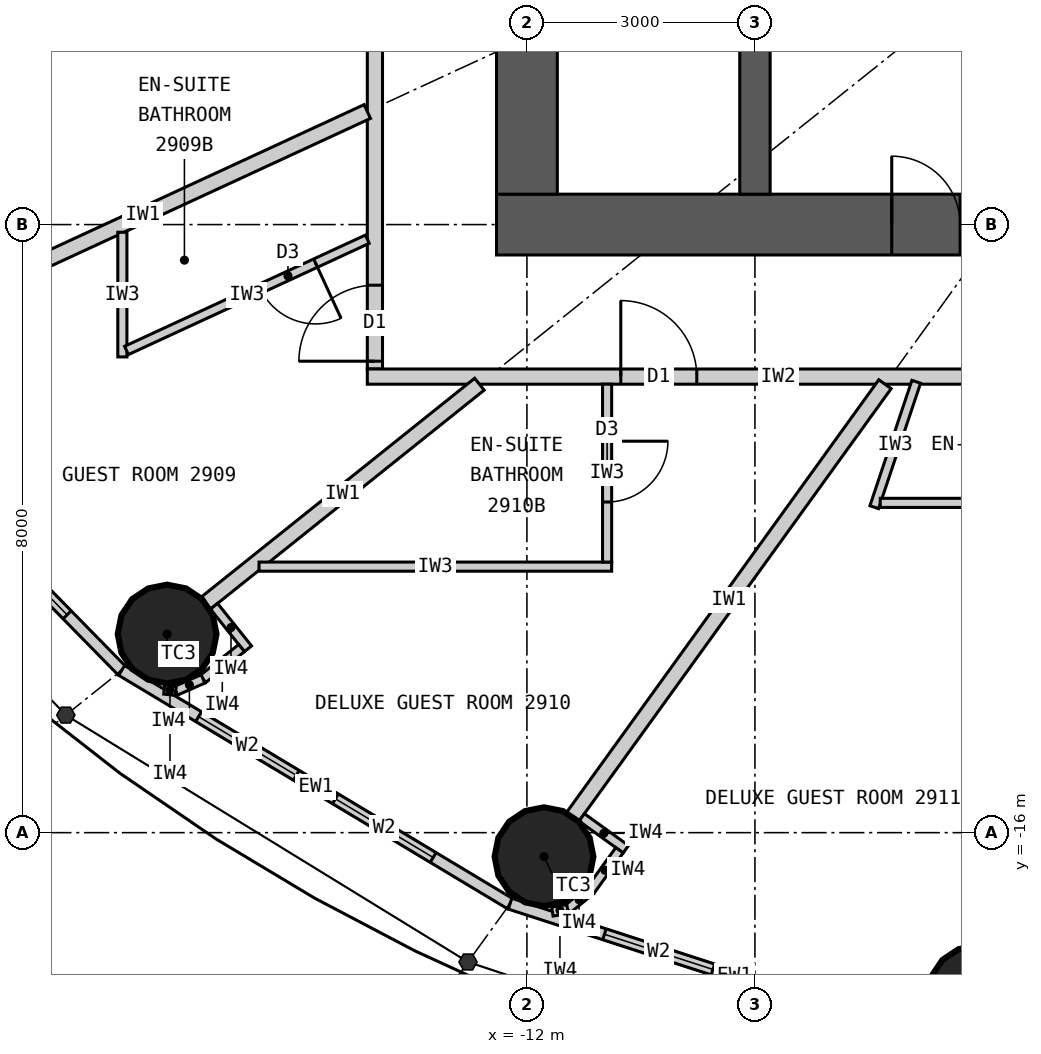
"""IFC4 building model, lengths in metres.
Left out: names, types, materials, properties, quantities, classifications, styles, units other than length and angle.
Written with IfcOpenShell. Run it as: python <this file> out.ifc"""

import sys

from ifc_helpers import new_model, si_unit, direction, frame, frame_2d, origin, origin_2d, place, context, subcontext, project, spatial, rectangle, circle, extrude, element, fill, save


model = new_model("IFC4")
c1 = context("Model", 3, precision=1e-05, world=origin(), true_north=direction((0.0, 1.0)))
c2 = subcontext(c1, "Body", "Model", "MODEL_VIEW")
j1 = project(units=[si_unit("LENGTHUNIT", "METRE"), si_unit("PLANEANGLEUNIT", "RADIAN")], contexts=[c1])
p1 = place(None, origin())
s1 = spatial("IfcSite", under=j1, at=p1, CompositionType="ELEMENT")
p2 = place(p1, origin())
s2 = spatial("IfcBuilding", under=s1, at=p2, CompositionType="ELEMENT")
p3 = place(p2, frame((0.0, 0.0, 115.5)))
s3 = spatial("IfcBuildingStorey", under=s2, at=p3, CompositionType="ELEMENT", Elevation=115.5)
for number, where, z_axis, x_axis in (
    (1, (-16.734, -13.387, 0.0), (0.0, 0.0, 1.0), (1.0, 0.0, 0.0)),
    (2, (-11.775, -16.316, 0.0), (0.0, 0.0, 1.0), (1.0, 0.0, 0.0)),
    (3, (-6.074, -18.135, 0.0), (0.0, 0.0, 1.0), (1.0, 0.0, 0.0)),
):
    element("IfcColumn", number, at=place(p3, frame(where, z_axis=z_axis, x_axis=x_axis)), inside=s3, PredefinedType="COLUMN", context=c2, shape_type="SweptSolid", body=[
        extrude(circle(Radius=0.65, at=origin_2d()), origin(), (0.0, 0.0, 1.0), 3.3),
    ])
p4 = place(p3, frame((12.4, -8.0, 0.0), z_axis=(0.0, 0.0, 1.0), x_axis=(-1.0, 0.0, 0.0)))
e4 = element("IfcWall", 4, at=p4, inside=s3, PredefinedType="SHEAR", context=c2, shape_type="SweptSolid", body=[
    extrude(rectangle(XDim=24.8, YDim=0.8, at=frame_2d((12.4, 0.0))), origin(), (0.0, 0.0, 1.0), 3.3),
])
p5 = place(p4, frame((11.1, 0.0, 0.0)))
e5 = element("IfcOpeningElement", 5, at=p5, cuts=e4, PredefinedType="OPENING", context=c2, shape_type="SweptSolid", body=[
    extrude(rectangle(XDim=1.2, YDim=2.2, at=frame_2d((0.6, 1.1))), frame((0.0, 0.41, 0.0), z_axis=(0.0, -1.0, 0.0), x_axis=(1.0, 0.0, 0.0)), (0.0, 0.0, 1.0), 0.82),
])
p6 = place(p4, frame((18.7, 0.0, 0.0)))
e6 = element("IfcOpeningElement", 6, at=p6, cuts=e4, PredefinedType="OPENING", context=c2, shape_type="SweptSolid", body=[
    extrude(rectangle(XDim=0.9, YDim=2.2, at=frame_2d((0.45, 1.1))), frame((0.0, 0.41, 0.0), z_axis=(0.0, -1.0, 0.0), x_axis=(1.0, 0.0, 0.0)), (0.0, 0.0, 1.0), 0.82),
])
p7 = place(p3, frame((-12.0, 7.6, 0.0), z_axis=(0.0, 0.0, 1.0), x_axis=(0.0, -1.0, 0.0)))
e7 = element("IfcWall", 7, at=p7, inside=s3, PredefinedType="SHEAR", context=c2, shape_type="SweptSolid", body=[
    extrude(rectangle(XDim=15.2, YDim=0.8, at=frame_2d((7.6, 0.0))), origin(), (0.0, 0.0, 1.0), 3.3),
])
p8 = place(p7, frame((6.7, 0.0, 0.0)))
e8 = element("IfcOpeningElement", 8, at=p8, cuts=e7, PredefinedType="OPENING", context=c2, shape_type="SweptSolid", body=[
    extrude(rectangle(XDim=1.8, YDim=2.2, at=frame_2d((0.9, 1.1))), frame((0.0, 0.41, 0.0), z_axis=(0.0, -1.0, 0.0), x_axis=(1.0, 0.0, 0.0)), (0.0, 0.0, 1.0), 0.82),
])
p9 = place(p3, frame((-9.0, -7.6, 0.0), z_axis=(0.0, 0.0, 1.0), x_axis=(0.0, 1.0, 0.0)))
e9 = element("IfcWall", 9, at=p9, inside=s3, PredefinedType="SHEAR", context=c2, shape_type="SweptSolid", body=[
    extrude(rectangle(XDim=3.1, YDim=0.4, at=frame_2d((1.55, 0.0))), origin(), (0.0, 0.0, 1.0), 3.3),
])
p10 = place(p3, frame((-21.287, -9.832, 0.0), z_axis=(0.0, 0.0, 1.0), x_axis=(0.700136650834, -0.714008872605, 0.0)))
e10 = element("IfcWall", 10, at=p10, inside=s3, PredefinedType="ELEMENTEDWALL", context=c2, shape_type="SweptSolid", body=[
    extrude(rectangle(XDim=5.649, YDim=0.15, at=frame_2d((2.825, 0.0))), origin(), (0.0, 0.0, 1.0), 3.12),
])
p11 = place(p10, frame((1.025, 0.0, 0.9)))
e11 = element("IfcOpeningElement", 11, at=p11, cuts=e10, PredefinedType="OPENING", context=c2, shape_type="SweptSolid", body=[
    extrude(rectangle(XDim=1.5, YDim=1.9, at=frame_2d((0.75, 0.95))), frame((0.0, 0.085, 0.0), z_axis=(0.0, -1.0, 0.0), x_axis=(1.0, 0.0, 0.0)), (0.0, 0.0, 1.0), 0.17),
])
p12 = place(p10, frame((3.125, 0.0, 0.9)))
e12 = element("IfcOpeningElement", 12, at=p12, cuts=e10, PredefinedType="OPENING", context=c2, shape_type="SweptSolid", body=[
    extrude(rectangle(XDim=1.5, YDim=1.9, at=frame_2d((0.75, 0.95))), frame((0.0, 0.085, 0.0), z_axis=(0.0, -1.0, 0.0), x_axis=(1.0, 0.0, 0.0)), (0.0, 0.0, 1.0), 0.17),
])
p13 = place(p3, frame((-17.332, -13.866, 0.0), z_axis=(0.0, 0.0, 1.0), x_axis=(0.857308573723, -0.514802884044, 0.0)))
e13 = element("IfcWall", 13, at=p13, inside=s3, PredefinedType="ELEMENTEDWALL", context=c2, shape_type="SweptSolid", body=[
    extrude(rectangle(XDim=5.961, YDim=0.15, at=frame_2d((2.98, 0.0))), origin(), (0.0, 0.0, 1.0), 3.12),
])
p14 = place(p13, frame((1.181, 0.0, 0.9)))
e14 = element("IfcOpeningElement", 14, at=p14, cuts=e13, PredefinedType="OPENING", context=c2, shape_type="SweptSolid", body=[
    extrude(rectangle(XDim=1.5, YDim=1.9, at=frame_2d((0.75, 0.95))), frame((0.0, 0.085, 0.0), z_axis=(0.0, -1.0, 0.0), x_axis=(1.0, 0.0, 0.0)), (0.0, 0.0, 1.0), 0.17),
])
p15 = place(p13, frame((3.281, 0.0, 0.9)))
e15 = element("IfcOpeningElement", 15, at=p15, cuts=e13, PredefinedType="OPENING", context=c2, shape_type="SweptSolid", body=[
    extrude(rectangle(XDim=1.5, YDim=1.9, at=frame_2d((0.75, 0.95))), frame((0.0, 0.085, 0.0), z_axis=(0.0, -1.0, 0.0), x_axis=(1.0, 0.0, 0.0)), (0.0, 0.0, 1.0), 0.17),
])
p16 = place(p3, frame((-12.221, -16.935, 0.0), z_axis=(0.0, 0.0, 1.0), x_axis=(0.951272691506, -0.308350881944, 0.0)))
e16 = element("IfcWall", 16, at=p16, inside=s3, PredefinedType="ELEMENTEDWALL", context=c2, shape_type="SweptSolid", body=[
    extrude(rectangle(XDim=6.211, YDim=0.15, at=frame_2d((3.105, 0.0))), origin(), (0.0, 0.0, 1.0), 3.12),
])
p17 = place(p16, frame((1.305, 0.0, 0.9)))
e17 = element("IfcOpeningElement", 17, at=p17, cuts=e16, PredefinedType="OPENING", context=c2, shape_type="SweptSolid", body=[
    extrude(rectangle(XDim=1.5, YDim=1.9, at=frame_2d((0.75, 0.95))), frame((0.0, 0.085, 0.0), z_axis=(0.0, -1.0, 0.0), x_axis=(1.0, 0.0, 0.0)), (0.0, 0.0, 1.0), 0.17),
])
p18 = place(p16, frame((3.405, 0.0, 0.9)))
e18 = element("IfcOpeningElement", 18, at=p18, cuts=e16, PredefinedType="OPENING", context=c2, shape_type="SweptSolid", body=[
    extrude(rectangle(XDim=1.5, YDim=1.9, at=frame_2d((0.75, 0.95))), frame((0.0, 0.085, 0.0), z_axis=(0.0, -1.0, 0.0), x_axis=(1.0, 0.0, 0.0)), (0.0, 0.0, 1.0), 0.17),
])
p19 = place(p3, frame((-14.0, 9.9, 0.0), z_axis=(0.0, 0.0, 1.0), x_axis=(0.0, -1.0, 0.0)))
e19 = element("IfcWall", 19, at=p19, inside=s3, PredefinedType="PARTITIONING", context=c2, shape_type="SweptSolid", body=[
    extrude(rectangle(XDim=19.8, YDim=0.2, at=frame_2d((9.9, 0.0))), origin(), (0.0, 0.0, 1.0), 3.12),
])
p20 = place(p19, frame((3.622, 0.0, 0.0)))
e20 = element("IfcOpeningElement", 20, at=p20, cuts=e19, PredefinedType="OPENING", context=c2, shape_type="SweptSolid", body=[
    extrude(rectangle(XDim=1.0, YDim=2.2, at=frame_2d((0.5, 1.1))), frame((0.0, 0.11, 0.0), z_axis=(0.0, -1.0, 0.0), x_axis=(1.0, 0.0, 0.0)), (0.0, 0.0, 1.0), 0.22),
])
p21 = place(p19, frame((9.238, 0.0, 0.0)))
e21 = element("IfcOpeningElement", 21, at=p21, cuts=e19, PredefinedType="OPENING", context=c2, shape_type="SweptSolid", body=[
    extrude(rectangle(XDim=1.0, YDim=2.2, at=frame_2d((0.5, 1.1))), frame((0.0, 0.11, 0.0), z_axis=(0.0, -1.0, 0.0), x_axis=(1.0, 0.0, 0.0)), (0.0, 0.0, 1.0), 0.22),
])
p22 = place(p19, frame((13.742, 0.0, 0.0)))
e22 = element("IfcOpeningElement", 22, at=p22, cuts=e19, PredefinedType="OPENING", context=c2, shape_type="SweptSolid", body=[
    extrude(rectangle(XDim=1.0, YDim=2.2, at=frame_2d((0.5, 1.1))), frame((0.0, 0.11, 0.0), z_axis=(0.0, -1.0, 0.0), x_axis=(1.0, 0.0, 0.0)), (0.0, 0.0, 1.0), 0.22),
])
p23 = place(p19, frame((18.698, 0.0, 0.0)))
e23 = element("IfcOpeningElement", 23, at=p23, cuts=e19, PredefinedType="OPENING", context=c2, shape_type="SweptSolid", body=[
    extrude(rectangle(XDim=1.0, YDim=2.2, at=frame_2d((0.5, 1.1))), frame((0.0, 0.11, 0.0), z_axis=(0.0, -1.0, 0.0), x_axis=(1.0, 0.0, 0.0)), (0.0, 0.0, 1.0), 0.22),
])
p24 = place(p3, frame((-3.283, -10.0, 0.0), z_axis=(0.0, 0.0, 1.0), x_axis=(-1.0, 0.0, 0.0)))
e24 = element("IfcWall", 24, at=p24, inside=s3, PredefinedType="PARTITIONING", context=c2, shape_type="SweptSolid", body=[
    extrude(rectangle(XDim=10.817, YDim=0.2, at=frame_2d((5.409, 0.0))), origin(), (0.0, 0.0, 1.0), 3.12),
])
p25 = place(p24, frame((6.482, 0.0, 0.0)))
e25 = element("IfcOpeningElement", 25, at=p25, cuts=e24, PredefinedType="OPENING", context=c2, shape_type="SweptSolid", body=[
    extrude(rectangle(XDim=1.0, YDim=2.2, at=frame_2d((0.5, 1.1))), frame((0.0, 0.11, 0.0), z_axis=(0.0, -1.0, 0.0), x_axis=(1.0, 0.0, 0.0)), (0.0, 0.0, 1.0), 0.22),
])
p26 = place(p3, frame((-14.1, -6.512, 0.0), z_axis=(0.0, 0.0, 1.0), x_axis=(-0.907833019998, -0.419331858797, 0.0)))
e26 = element("IfcWall", 26, at=p26, inside=s3, PredefinedType="PARTITIONING", context=c2, shape_type="SweptSolid", body=[
    extrude(rectangle(XDim=6.505, YDim=0.2, at=frame_2d((3.252, 0.0))), origin(), (0.0, 0.0, 1.0), 2.27),
])
p27 = place(p3, frame((-12.625, -10.1, 0.0), z_axis=(0.0, 0.0, 1.0), x_axis=(-0.780863644897, -0.624701503182, 0.0)))
e27 = element("IfcWall", 27, at=p27, inside=s3, PredefinedType="PARTITIONING", context=c2, shape_type="SweptSolid", body=[
    extrude(rectangle(XDim=4.612, YDim=0.2, at=frame_2d((2.306, 0.0))), origin(), (0.0, 0.0, 1.0), 2.37),
])
p28 = place(p3, frame((-7.289, -10.1, 0.0), z_axis=(0.0, 0.0, 1.0), x_axis=(-0.585217367024, -0.81087645997, 0.0)))
e28 = element("IfcWall", 28, at=p28, inside=s3, PredefinedType="PARTITIONING", context=c2, shape_type="SweptSolid", body=[
    extrude(rectangle(XDim=7.016, YDim=0.2, at=frame_2d((3.508, 0.0))), origin(), (0.0, 0.0, 1.0), 2.37),
])
p29 = place(p3, frame((-17.323, -8.101, 0.0), z_axis=(0.0, 0.0, 1.0), x_axis=(0.0, -1.0, 0.0)))
e29 = element("IfcWall", 29, at=p29, inside=s3, PredefinedType="PARTITIONING", context=c2, shape_type="SweptSolid", body=[
    extrude(rectangle(XDim=1.64, YDim=0.12, at=frame_2d((0.82, 0.0))), origin(), (0.0, 0.0, 1.0), 3.12),
])
p30 = place(p3, frame((-14.1, -8.193, 0.0), z_axis=(0.0, 0.0, 1.0), x_axis=(-0.907836493557, -0.419324338628, 0.0)))
e30 = element("IfcWall", 30, at=p30, inside=s3, PredefinedType="PARTITIONING", context=c2, shape_type="SweptSolid", body=[
    extrude(rectangle(XDim=3.49, YDim=0.12, at=frame_2d((1.745, 0.0))), origin(), (0.0, 0.0, 1.0), 3.12),
])
p31 = place(p30, frame((0.75, 0.0, 0.0)))
e31 = element("IfcOpeningElement", 31, at=p31, cuts=e30, PredefinedType="OPENING", context=c2, shape_type="SweptSolid", body=[
    extrude(rectangle(XDim=0.8, YDim=2.1, at=frame_2d((0.4, 1.05))), frame((0.0, 0.07, 0.0), z_axis=(0.0, -1.0, 0.0), x_axis=(1.0, 0.0, 0.0)), (0.0, 0.0, 1.0), 0.14),
])
p32 = place(p3, frame((-15.525, -12.5, 0.0), z_axis=(0.0, 0.0, 1.0), x_axis=(1.0, 0.0, 0.0)))
e32 = element("IfcWall", 32, at=p32, inside=s3, PredefinedType="PARTITIONING", context=c2, shape_type="SweptSolid", body=[
    extrude(rectangle(XDim=4.64, YDim=0.12, at=frame_2d((2.32, 0.0))), origin(), (0.0, 0.0, 1.0), 3.12),
])
p33 = place(p3, frame((-10.945, -10.1, 0.0), z_axis=(0.0, 0.0, 1.0), x_axis=(0.0, -1.0, 0.0)))
e33 = element("IfcWall", 33, at=p33, inside=s3, PredefinedType="PARTITIONING", context=c2, shape_type="SweptSolid", body=[
    extrude(rectangle(XDim=2.34, YDim=0.12, at=frame_2d((1.17, 0.0))), origin(), (0.0, 0.0, 1.0), 3.12),
])
p34 = place(p33, frame((0.75, 0.0, 0.0)))
e34 = element("IfcOpeningElement", 34, at=p34, cuts=e33, PredefinedType="OPENING", context=c2, shape_type="SweptSolid", body=[
    extrude(rectangle(XDim=0.8, YDim=2.1, at=frame_2d((0.4, 1.05))), frame((0.0, 0.07, 0.0), z_axis=(0.0, -1.0, 0.0), x_axis=(1.0, 0.0, 0.0)), (0.0, 0.0, 1.0), 0.14),
])
p35 = place(p3, frame((-6.878, -10.068, 0.0), z_axis=(0.0, 0.0, 1.0), x_axis=(-0.317532394508, -0.948247424694, 0.0)))
e35 = element("IfcWall", 35, at=p35, inside=s3, PredefinedType="PARTITIONING", context=c2, shape_type="SweptSolid", body=[
    extrude(rectangle(XDim=1.74, YDim=0.12, at=frame_2d((0.87, 0.0))), origin(), (0.0, 0.0, 1.0), 3.12),
])
p36 = place(p3, frame((-4.011, -11.661, 0.0), z_axis=(0.0, 0.0, 1.0), x_axis=(-1.0, 0.0, 0.0)))
e36 = element("IfcWall", 36, at=p36, inside=s3, PredefinedType="PARTITIONING", context=c2, shape_type="SweptSolid", body=[
    extrude(rectangle(XDim=3.34, YDim=0.12, at=frame_2d((1.67, 0.0))), origin(), (0.0, 0.0, 1.0), 3.12),
])
p37 = place(p36, frame((0.75, 0.0, 0.0)))
e37 = element("IfcOpeningElement", 37, at=p37, cuts=e36, PredefinedType="OPENING", context=c2, shape_type="SweptSolid", body=[
    extrude(rectangle(XDim=0.8, YDim=2.1, at=frame_2d((0.4, 1.05))), frame((0.0, 0.07, 0.0), z_axis=(0.0, -1.0, 0.0), x_axis=(1.0, 0.0, 0.0)), (0.0, 0.0, 1.0), 0.14),
])
p38 = place(p3, frame((-16.117, -13.022, 0.0), z_axis=(0.0, 0.0, 1.0), x_axis=(0.62465344249, -0.780902091677, 0.0)))
e38 = element("IfcWall", 38, at=p38, inside=s3, PredefinedType="PARTITIONING", context=c2, shape_type="SweptSolid", body=[
    extrude(rectangle(XDim=0.716, YDim=0.12, at=frame_2d((0.358, 0.0))), origin(), (0.0, 0.0, 1.0), 3.12),
])
p39 = place(p3, frame((-15.754, -13.571, 0.0), z_axis=(0.0, 0.0, 1.0), x_axis=(-0.780905453553, -0.624649239663, 0.0)))
e39 = element("IfcWall", 39, at=p39, inside=s3, PredefinedType="PARTITIONING", context=c2, shape_type="SweptSolid", body=[
    extrude(rectangle(XDim=0.65, YDim=0.12, at=frame_2d((0.325, 0.0))), origin(), (0.0, 0.0, 1.0), 3.12),
])
p40 = place(p3, frame((-16.262, -13.977, 0.0), z_axis=(0.0, 0.0, 1.0), x_axis=(-0.915985403703, -0.401211590314, 0.0)))
e40 = element("IfcWall", 40, at=p40, inside=s3, PredefinedType="PARTITIONING", context=c2, shape_type="SweptSolid", body=[
    extrude(rectangle(XDim=0.391, YDim=0.12, at=frame_2d((0.196, 0.0))), origin(), (0.0, 0.0, 1.0), 3.12),
])
p41 = place(p3, frame((-16.62, -14.134, 0.0), z_axis=(0.0, 0.0, 1.0), x_axis=(-0.993941871493, 0.109907033867, 0.0)))
e41 = element("IfcWall", 41, at=p41, inside=s3, PredefinedType="PARTITIONING", context=c2, shape_type="SweptSolid", body=[
    extrude(rectangle(XDim=0.153, YDim=0.12, at=frame_2d((0.077, 0.0))), origin(), (0.0, 0.0, 1.0), 3.12),
])
p42 = place(p3, frame((-11.279, -15.799, 0.0), z_axis=(0.0, 0.0, 1.0), x_axis=(0.810912957127, -0.585166793285, 0.0)))
e42 = element("IfcWall", 42, at=p42, inside=s3, PredefinedType="PARTITIONING", context=c2, shape_type="SweptSolid", body=[
    extrude(rectangle(XDim=0.716, YDim=0.12, at=frame_2d((0.358, 0.0))), origin(), (0.0, 0.0, 1.0), 3.12),
])
p43 = place(p3, frame((-10.782, -16.231, 0.0), z_axis=(0.0, 0.0, 1.0), x_axis=(-0.585175102182, -0.810906961239, 0.0)))
e43 = element("IfcWall", 43, at=p43, inside=s3, PredefinedType="PARTITIONING", context=c2, shape_type="SweptSolid", body=[
    extrude(rectangle(XDim=0.65, YDim=0.12, at=frame_2d((0.325, 0.0))), origin(), (0.0, 0.0, 1.0), 3.12),
])
p44 = place(p3, frame((-11.162, -16.759, 0.0), z_axis=(0.0, 0.0, 1.0), x_axis=(-0.775178428527, -0.63174235567, 0.0)))
e44 = element("IfcWall", 44, at=p44, inside=s3, PredefinedType="PARTITIONING", context=c2, shape_type="SweptSolid", body=[
    extrude(rectangle(XDim=0.392, YDim=0.12, at=frame_2d((0.196, 0.0))), origin(), (0.0, 0.0, 1.0), 3.12),
])
p45 = place(p3, frame((-11.466, -17.006, 0.0), z_axis=(0.0, 0.0, 1.0), x_axis=(-0.987228877621, -0.15930832744, 0.0)))
e45 = element("IfcWall", 45, at=p45, inside=s3, PredefinedType="PARTITIONING", context=c2, shape_type="SweptSolid", body=[
    extrude(rectangle(XDim=0.202, YDim=0.12, at=frame_2d((0.101, 0.0))), origin(), (0.0, 0.0, 1.0), 3.12),
])
p46 = place(p12, origin())
e46 = element("IfcWindow", 46, at=p46, inside=s3, PartitioningType="SINGLE_PANEL", PredefinedType="WINDOW", context=c2, shape_type="SweptSolid", body=[
    extrude(rectangle(XDim=1.5, YDim=1.9, at=frame_2d((0.75, 0.95))), frame((0.0, 0.03, 0.0), z_axis=(0.0, -1.0, 0.0), x_axis=(1.0, 0.0, 0.0)), (0.0, 0.0, 1.0), 0.06),
])
fill(e12, e46)
p47 = place(p14, origin())
e47 = element("IfcWindow", 47, at=p47, inside=s3, PartitioningType="SINGLE_PANEL", PredefinedType="WINDOW", context=c2, shape_type="SweptSolid", body=[
    extrude(rectangle(XDim=1.5, YDim=1.9, at=frame_2d((0.75, 0.95))), frame((0.0, 0.03, 0.0), z_axis=(0.0, -1.0, 0.0), x_axis=(1.0, 0.0, 0.0)), (0.0, 0.0, 1.0), 0.06),
])
fill(e14, e47)
p48 = place(p15, origin())
e48 = element("IfcWindow", 48, at=p48, inside=s3, PartitioningType="SINGLE_PANEL", PredefinedType="WINDOW", context=c2, shape_type="SweptSolid", body=[
    extrude(rectangle(XDim=1.5, YDim=1.9, at=frame_2d((0.75, 0.95))), frame((0.0, 0.03, 0.0), z_axis=(0.0, -1.0, 0.0), x_axis=(1.0, 0.0, 0.0)), (0.0, 0.0, 1.0), 0.06),
])
fill(e15, e48)
p49 = place(p17, origin())
e49 = element("IfcWindow", 49, at=p49, inside=s3, PartitioningType="SINGLE_PANEL", PredefinedType="WINDOW", context=c2, shape_type="SweptSolid", body=[
    extrude(rectangle(XDim=1.5, YDim=1.9, at=frame_2d((0.75, 0.95))), frame((0.0, 0.03, 0.0), z_axis=(0.0, -1.0, 0.0), x_axis=(1.0, 0.0, 0.0)), (0.0, 0.0, 1.0), 0.06),
])
fill(e17, e49)
p50 = place(p31, origin())
e50 = element("IfcDoor", 50, at=p50, inside=s3, OperationType="SINGLE_SWING_LEFT", PredefinedType="DOOR", context=c2, shape_type="SweptSolid", body=[
    extrude(rectangle(XDim=0.8, YDim=2.1, at=frame_2d((0.4, 1.05))), frame((0.0, 0.025, 0.0), z_axis=(0.0, -1.0, 0.0), x_axis=(1.0, 0.0, 0.0)), (0.0, 0.0, 1.0), 0.05),
])
fill(e31, e50)
p51 = place(p23, origin())
e51 = element("IfcDoor", 51, at=p51, inside=s3, OperationType="SINGLE_SWING_RIGHT", PredefinedType="DOOR", context=c2, shape_type="SweptSolid", body=[
    extrude(rectangle(XDim=1.0, YDim=2.2, at=frame_2d((0.5, 1.1))), frame((0.0, 0.025, 0.0), z_axis=(0.0, -1.0, 0.0), x_axis=(1.0, 0.0, 0.0)), (0.0, 0.0, 1.0), 0.05),
])
fill(e23, e51)
p52 = place(p34, origin())
e52 = element("IfcDoor", 52, at=p52, inside=s3, OperationType="SINGLE_SWING_LEFT", PredefinedType="DOOR", context=c2, shape_type="SweptSolid", body=[
    extrude(rectangle(XDim=0.8, YDim=2.1, at=frame_2d((0.4, 1.05))), frame((0.0, 0.025, 0.0), z_axis=(0.0, -1.0, 0.0), x_axis=(1.0, 0.0, 0.0)), (0.0, 0.0, 1.0), 0.05),
])
fill(e34, e52)
p53 = place(p25, origin())
e53 = element("IfcDoor", 53, at=p53, inside=s3, OperationType="SINGLE_SWING_RIGHT", PredefinedType="DOOR", context=c2, shape_type="SweptSolid", body=[
    extrude(rectangle(XDim=1.0, YDim=2.2, at=frame_2d((0.5, 1.1))), frame((0.0, 0.025, 0.0), z_axis=(0.0, -1.0, 0.0), x_axis=(1.0, 0.0, 0.0)), (0.0, 0.0, 1.0), 0.05),
])
fill(e25, e53)
p54 = place(p6, origin())
e54 = element("IfcDoor", 54, at=p54, inside=s3, OperationType="SINGLE_SWING_RIGHT", PredefinedType="DOOR", context=c2, shape_type="SweptSolid", body=[
    extrude(rectangle(XDim=0.9, YDim=2.2, at=frame_2d((0.45, 1.1))), frame((0.0, 0.025, 0.0), z_axis=(0.0, -1.0, 0.0), x_axis=(1.0, 0.0, 0.0)), (0.0, 0.0, 1.0), 0.05),
])
fill(e6, e54)
save(model, sys.argv[1])
